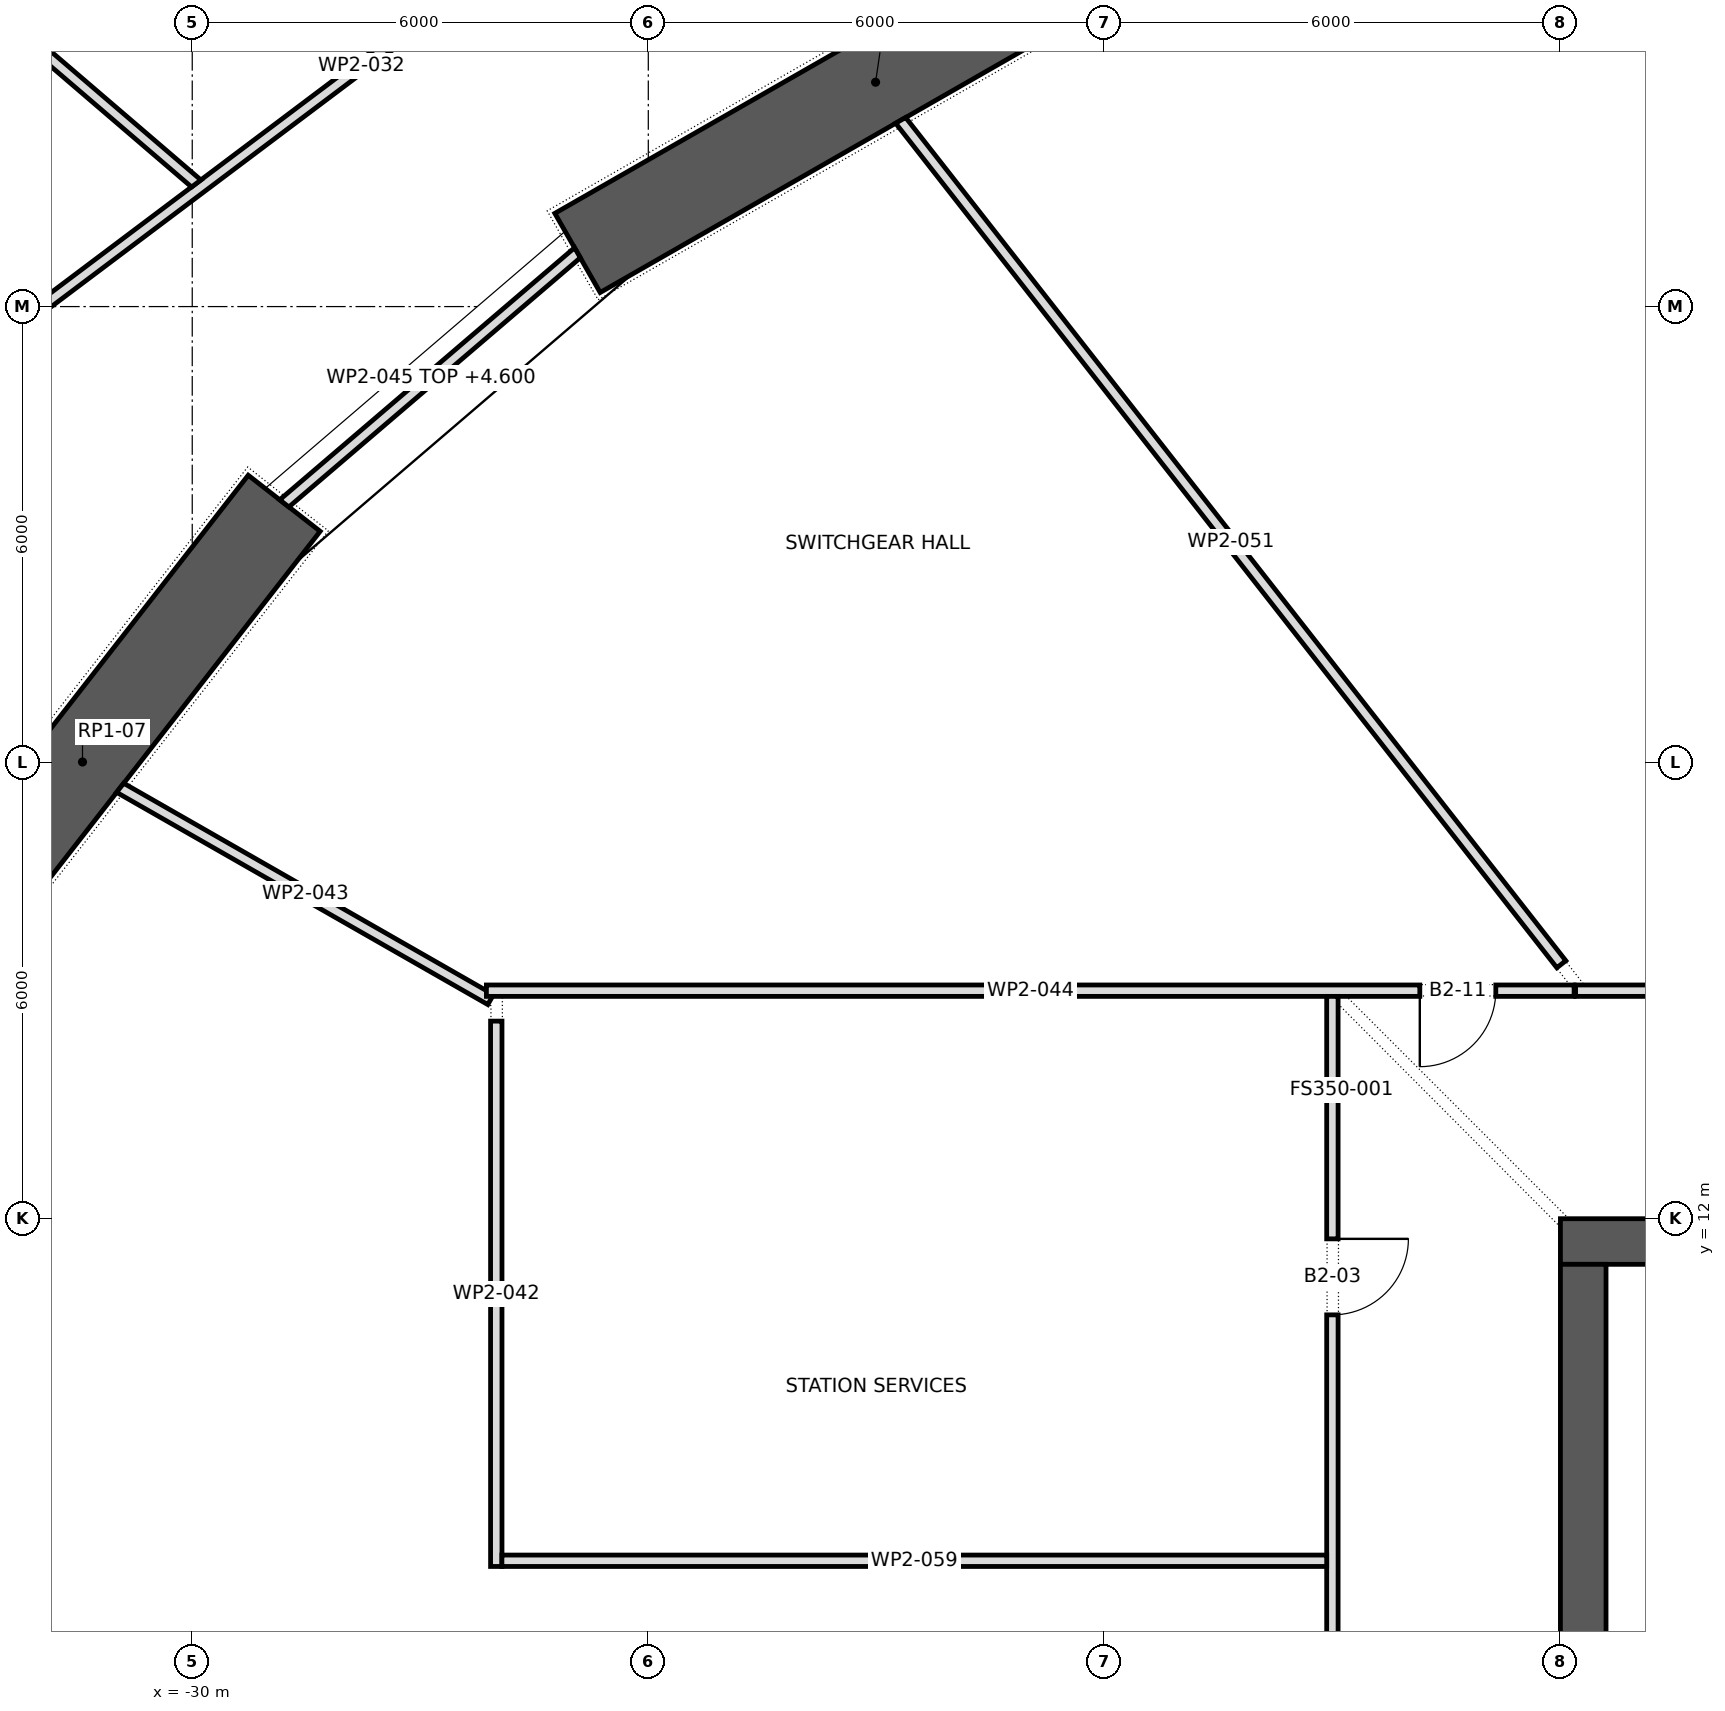
"""IFC4 building model, lengths in metres.
Left out: names, types, materials, properties, quantities, classifications, styles, units other than length and angle.
Written with IfcOpenShell. Run it as: python <this file> out.ifc"""

import sys

from ifc_helpers import new_model, si_unit, direction, frame, frame_2d, origin, place, context, subcontext, project, spatial, polyline, rectangle, outline, extrude, element, fill, save


model = new_model("IFC4")
c1 = context("Model", 3, precision=1e-05, world=origin(), true_north=direction((0.0, 1.0)))
c2 = subcontext(c1, "Body", "Model", "MODEL_VIEW")
j1 = project(units=[si_unit("LENGTHUNIT", "METRE"), si_unit("PLANEANGLEUNIT", "RADIAN")], contexts=[c1])
p1 = place(None, origin())
s1 = spatial("IfcSite", under=j1, at=p1, CompositionType="ELEMENT")
p2 = place(p1, origin())
s2 = spatial("IfcBuilding", under=s1, at=p2, CompositionType="ELEMENT")
p3 = place(p2, frame((0.0, 0.0, -9.5)))
s3 = spatial("IfcBuildingStorey", under=s2, at=p3, CompositionType="ELEMENT", Elevation=-9.5)
p4 = place(p3, frame((-17.089, 29.198, 0.0), z_axis=(0.0, 0.0, 1.0), x_axis=(-0.867760656864, -0.496982336103, 0.0)))
e1 = element("IfcWall", 1, at=p4, inside=s3, PredefinedType="SHEAR", context=c2, shape_type="SweptSolid", body=[
    extrude(rectangle(XDim=9.038, YDim=1.2, at=frame_2d((4.519, 0.0))), origin(), (0.0, 0.0, 1.0), 5.5),
])
p5 = place(p3, frame((-28.79, 21.412, 0.0), z_axis=(0.0, 0.0, 1.0), x_axis=(-0.614825322247, -0.788663314174, 0.0)))
e2 = element("IfcWall", 2, at=p5, inside=s3, PredefinedType="SHEAR", context=c2, shape_type="SweptSolid", body=[
    extrude(rectangle(XDim=8.632, YDim=1.2, at=frame_2d((4.316, 0.0))), origin(), (0.0, 0.0, 1.0), 5.5),
])
p6 = place(p3, frame((-12.0, 11.7, 0.0), z_axis=(0.0, 0.0, 1.0), x_axis=(1.0, 0.0, 0.0)))
e3 = element("IfcWall", 3, at=p6, inside=s3, PredefinedType="SHEAR", context=c2, shape_type="SweptSolid", body=[
    extrude(rectangle(XDim=24.0, YDim=0.6, at=frame_2d((12.0, 0.0))), origin(), (0.0, 0.0, 1.0), 5.5),
])
p7 = place(p6, frame((11.6, 0.0, 0.0)))
e4 = element("IfcOpeningElement", 4, at=p7, cuts=e3, PredefinedType="OPENING", context=c2, shape_type="SweptSolid", body=[
    extrude(rectangle(XDim=0.8, YDim=2.1, at=frame_2d((0.4, 1.05))), frame((0.0, 0.312, 0.0), z_axis=(0.0, -1.0, 0.0), x_axis=(1.0, 0.0, 0.0)), (0.0, 0.0, 1.0), 0.624),
])
p8 = place(p3, frame((-11.7, -11.4, 0.0), z_axis=(0.0, 0.0, 1.0), x_axis=(0.0, 1.0, 0.0)))
e5 = element("IfcWall", 5, at=p8, inside=s3, PredefinedType="SHEAR", context=c2, shape_type="SweptSolid", body=[
    extrude(rectangle(XDim=22.8, YDim=0.6, at=frame_2d((11.4, 0.0))), origin(), (0.0, 0.0, 1.0), 5.5),
])
p9 = place(p8, frame((10.2, 0.0, 0.0)))
e6 = element("IfcOpeningElement", 6, at=p9, cuts=e5, PredefinedType="OPENING", context=c2, shape_type="SweptSolid", body=[
    extrude(rectangle(XDim=2.4, YDim=2.1, at=frame_2d((1.2, 1.05))), frame((0.0, 0.312, 0.0), z_axis=(0.0, -1.0, 0.0), x_axis=(1.0, 0.0, 0.0)), (0.0, 0.0, 1.0), 0.624),
])
p10 = place(p3, frame((-31.947, 24.022, 0.0), z_axis=(0.0, 0.0, 1.0), x_axis=(0.799194171191, 0.601072937949, 0.0)))
e7 = element("IfcWall", 7, at=p10, inside=s3, PredefinedType="PARTITIONING", context=c2, shape_type="SweptSolid", body=[
    extrude(rectangle(XDim=10.444, YDim=0.15, at=frame_2d((5.222, 0.0))), origin(), (0.0, 0.0, 1.0), 5.05),
])
p11 = place(p3, frame((-29.947, 25.619, 0.0), z_axis=(0.0, 0.0, 1.0), x_axis=(-0.759265306208, 0.650781218836, 0.0)))
e8 = element("IfcWall", 8, at=p11, inside=s3, PredefinedType="PARTITIONING", context=c2, shape_type="SweptSolid", body=[
    extrude(outline(polyline([(-0.017, -0.075), (9.888, -0.075), (9.911, 0.075), (0.017, 0.075), (-0.017, -0.075)])), origin(), (0.0, 0.0, 1.0), 5.05),
])
p12 = place(p3, frame((-26.0, 7.425, 0.0), z_axis=(0.0, 0.0, 1.0), x_axis=(0.0, 1.0, 0.0)))
e9 = element("IfcWall", 9, at=p12, inside=s3, PredefinedType="PARTITIONING", context=c2, shape_type="SweptSolid", body=[
    extrude(rectangle(XDim=7.175, YDim=0.15, at=frame_2d((3.587, 0.0))), origin(), (0.0, 0.0, 1.0), 5.05),
])
p13 = place(p3, frame((-26.074, 14.882, 0.0), z_axis=(0.0, 0.0, 1.0), x_axis=(-0.868133416031, 0.496330909746, 0.0)))
e10 = element("IfcWall", 10, at=p13, inside=s3, PredefinedType="PARTITIONING", context=c2, shape_type="SweptSolid", body=[
    extrude(outline(polyline([(0.0, -0.075), (5.604, -0.075), (5.626, 0.075), (0.0, 0.075), (0.0, -0.075)])), origin(), (0.0, 0.0, 1.0), 5.05),
])
p14 = place(p3, frame((-26.13, 15.0, 0.0), z_axis=(0.0, 0.0, 1.0), x_axis=(1.0, 0.0, 0.0)))
e11 = element("IfcWall", 11, at=p14, inside=s3, PredefinedType="PARTITIONING", context=c2, shape_type="SweptSolid", body=[
    extrude(rectangle(XDim=14.32, YDim=0.15, at=frame_2d((7.16, 0.0))), origin(), (0.0, 0.0, 1.0), 5.05),
])
p15 = place(p14, frame((12.28, 0.0, 0.0)))
e12 = element("IfcOpeningElement", 12, at=p15, cuts=e11, PredefinedType="OPENING", context=c2, shape_type="SweptSolid", body=[
    extrude(rectangle(XDim=1.0, YDim=2.1, at=frame_2d((0.5, 1.05))), frame((0.0, 0.087, 0.0), z_axis=(0.0, -1.0, 0.0), x_axis=(1.0, 0.0, 0.0)), (0.0, 0.0, 1.0), 0.174),
])
p16 = place(p3, frame((-24.932, 24.708, 0.0), z_axis=(0.0, 0.0, 1.0), x_axis=(-0.760084552743, -0.649824185978, 0.0)))
e13 = element("IfcWall", 13, at=p16, inside=s3, PredefinedType="PARTITIONING", context=c2, shape_type="SweptSolid", body=[
    extrude(outline(polyline([(-0.014, -0.075), (5.09, -0.075), (5.06, 0.075), (0.014, 0.075), (-0.014, -0.075)])), origin(), (0.0, 0.0, 1.0), 4.6),
])
p17 = place(p3, frame((-20.68, 26.45, 0.0), z_axis=(0.0, 0.0, 1.0), x_axis=(0.616465586388, -0.787381851962, 0.0)))
e14 = element("IfcWall", 14, at=p17, inside=s3, PredefinedType="PARTITIONING", context=c2, shape_type="SweptSolid", body=[
    extrude(outline(polyline([(-0.011, -0.075), (14.1, -0.075), (14.1, 0.075), (0.011, 0.075), (-0.011, -0.075)])), origin(), (0.0, 0.0, 1.0), 5.05),
])
p18 = place(p3, frame((-15.0, -14.925, 0.0), z_axis=(0.0, 0.0, 1.0), x_axis=(0.0, 1.0, 0.0)))
e15 = element("IfcWall", 15, at=p18, inside=s3, PredefinedType="PARTITIONING", context=c2, shape_type="SweptSolid", body=[
    extrude(rectangle(XDim=29.85, YDim=0.15, at=frame_2d((14.925, 0.0))), origin(), (0.0, 0.0, 1.0), 5.05),
])
p19 = place(p18, frame((25.66, 0.0, 0.0)))
e16 = element("IfcOpeningElement", 16, at=p19, cuts=e15, PredefinedType="OPENING", context=c2, shape_type="SweptSolid", body=[
    extrude(rectangle(XDim=1.0, YDim=2.1, at=frame_2d((0.5, 1.05))), frame((0.0, 0.087, 0.0), z_axis=(0.0, -1.0, 0.0), x_axis=(1.0, 0.0, 0.0)), (0.0, 0.0, 1.0), 0.174),
])
p20 = place(p18, frame((3.19, 0.0, 0.0)))
e17 = element("IfcOpeningElement", 17, at=p20, cuts=e15, PredefinedType="OPENING", context=c2, shape_type="SweptSolid", body=[
    extrude(rectangle(XDim=1.0, YDim=2.1, at=frame_2d((0.5, 1.05))), frame((0.0, 0.087, 0.0), z_axis=(0.0, -1.0, 0.0), x_axis=(1.0, 0.0, 0.0)), (0.0, 0.0, 1.0), 0.174),
])
p21 = place(p18, frame((13.725, 0.0, 0.0)))
e18 = element("IfcOpeningElement", 18, at=p21, cuts=e15, PredefinedType="OPENING", context=c2, shape_type="SweptSolid", body=[
    extrude(rectangle(XDim=2.4, YDim=2.1, at=frame_2d((1.2, 1.05))), frame((0.0, 0.087, 0.0), z_axis=(0.0, -1.0, 0.0), x_axis=(1.0, 0.0, 0.0)), (0.0, 0.0, 1.0), 0.174),
])
p22 = place(p3, frame((-15.075, 7.5, 0.0), z_axis=(0.0, 0.0, 1.0), x_axis=(-1.0, 0.0, 0.0)))
e19 = element("IfcWall", 19, at=p22, inside=s3, PredefinedType="PARTITIONING", context=c2, shape_type="SweptSolid", body=[
    extrude(rectangle(XDim=10.851, YDim=0.15, at=frame_2d((5.426, 0.0))), origin(), (0.0, 0.0, 1.0), 5.05),
])
p23 = place(p3, frame((-11.811, 15.0, 0.0), z_axis=(0.0, 0.0, 1.0), x_axis=(1.0, 0.0, 0.0)))
e20 = element("IfcWall", 20, at=p23, inside=s3, PredefinedType="PARTITIONING", context=c2, shape_type="SweptSolid", body=[
    extrude(rectangle(XDim=10.686, YDim=0.15, at=frame_2d((5.343, 0.0))), origin(), (0.0, 0.0, 1.0), 5.05),
])
p24 = place(p23, frame((4.441, 0.0, 0.0)))
e21 = element("IfcOpeningElement", 21, at=p24, cuts=e20, PredefinedType="OPENING", context=c2, shape_type="SweptSolid", body=[
    extrude(rectangle(XDim=1.8, YDim=2.1, at=frame_2d((0.9, 1.05))), frame((0.0, 0.087, 0.0), z_axis=(0.0, -1.0, 0.0), x_axis=(1.0, 0.0, 0.0)), (0.0, 0.0, 1.0), 0.174),
])
p25 = place(p19, frame((1.0, 0.0, 0.0), z_axis=(0.0, 0.0, 1.0), x_axis=(-1.0, 0.0, 0.0)))
e22 = element("IfcDoor", 22, at=p25, inside=s3, OperationType="SINGLE_SWING_RIGHT", PredefinedType="DOOR", context=c2, shape_type="SweptSolid", body=[
    extrude(rectangle(XDim=1.0, YDim=2.1, at=frame_2d((0.5, 1.05))), frame((0.0, 0.025, 0.0), z_axis=(0.0, -1.0, 0.0), x_axis=(1.0, 0.0, 0.0)), (0.0, 0.0, 1.0), 0.05),
])
fill(e16, e22)
p26 = place(p15, frame((1.0, 0.0, 0.0), z_axis=(0.0, 0.0, 1.0), x_axis=(-1.0, 0.0, 0.0)))
e23 = element("IfcDoor", 23, at=p26, inside=s3, OperationType="SINGLE_SWING_LEFT", PredefinedType="DOOR", context=c2, shape_type="SweptSolid", body=[
    extrude(rectangle(XDim=1.0, YDim=2.1, at=frame_2d((0.5, 1.05))), frame((0.0, 0.025, 0.0), z_axis=(0.0, -1.0, 0.0), x_axis=(1.0, 0.0, 0.0)), (0.0, 0.0, 1.0), 0.05),
])
fill(e12, e23)
save(model, sys.argv[1])
